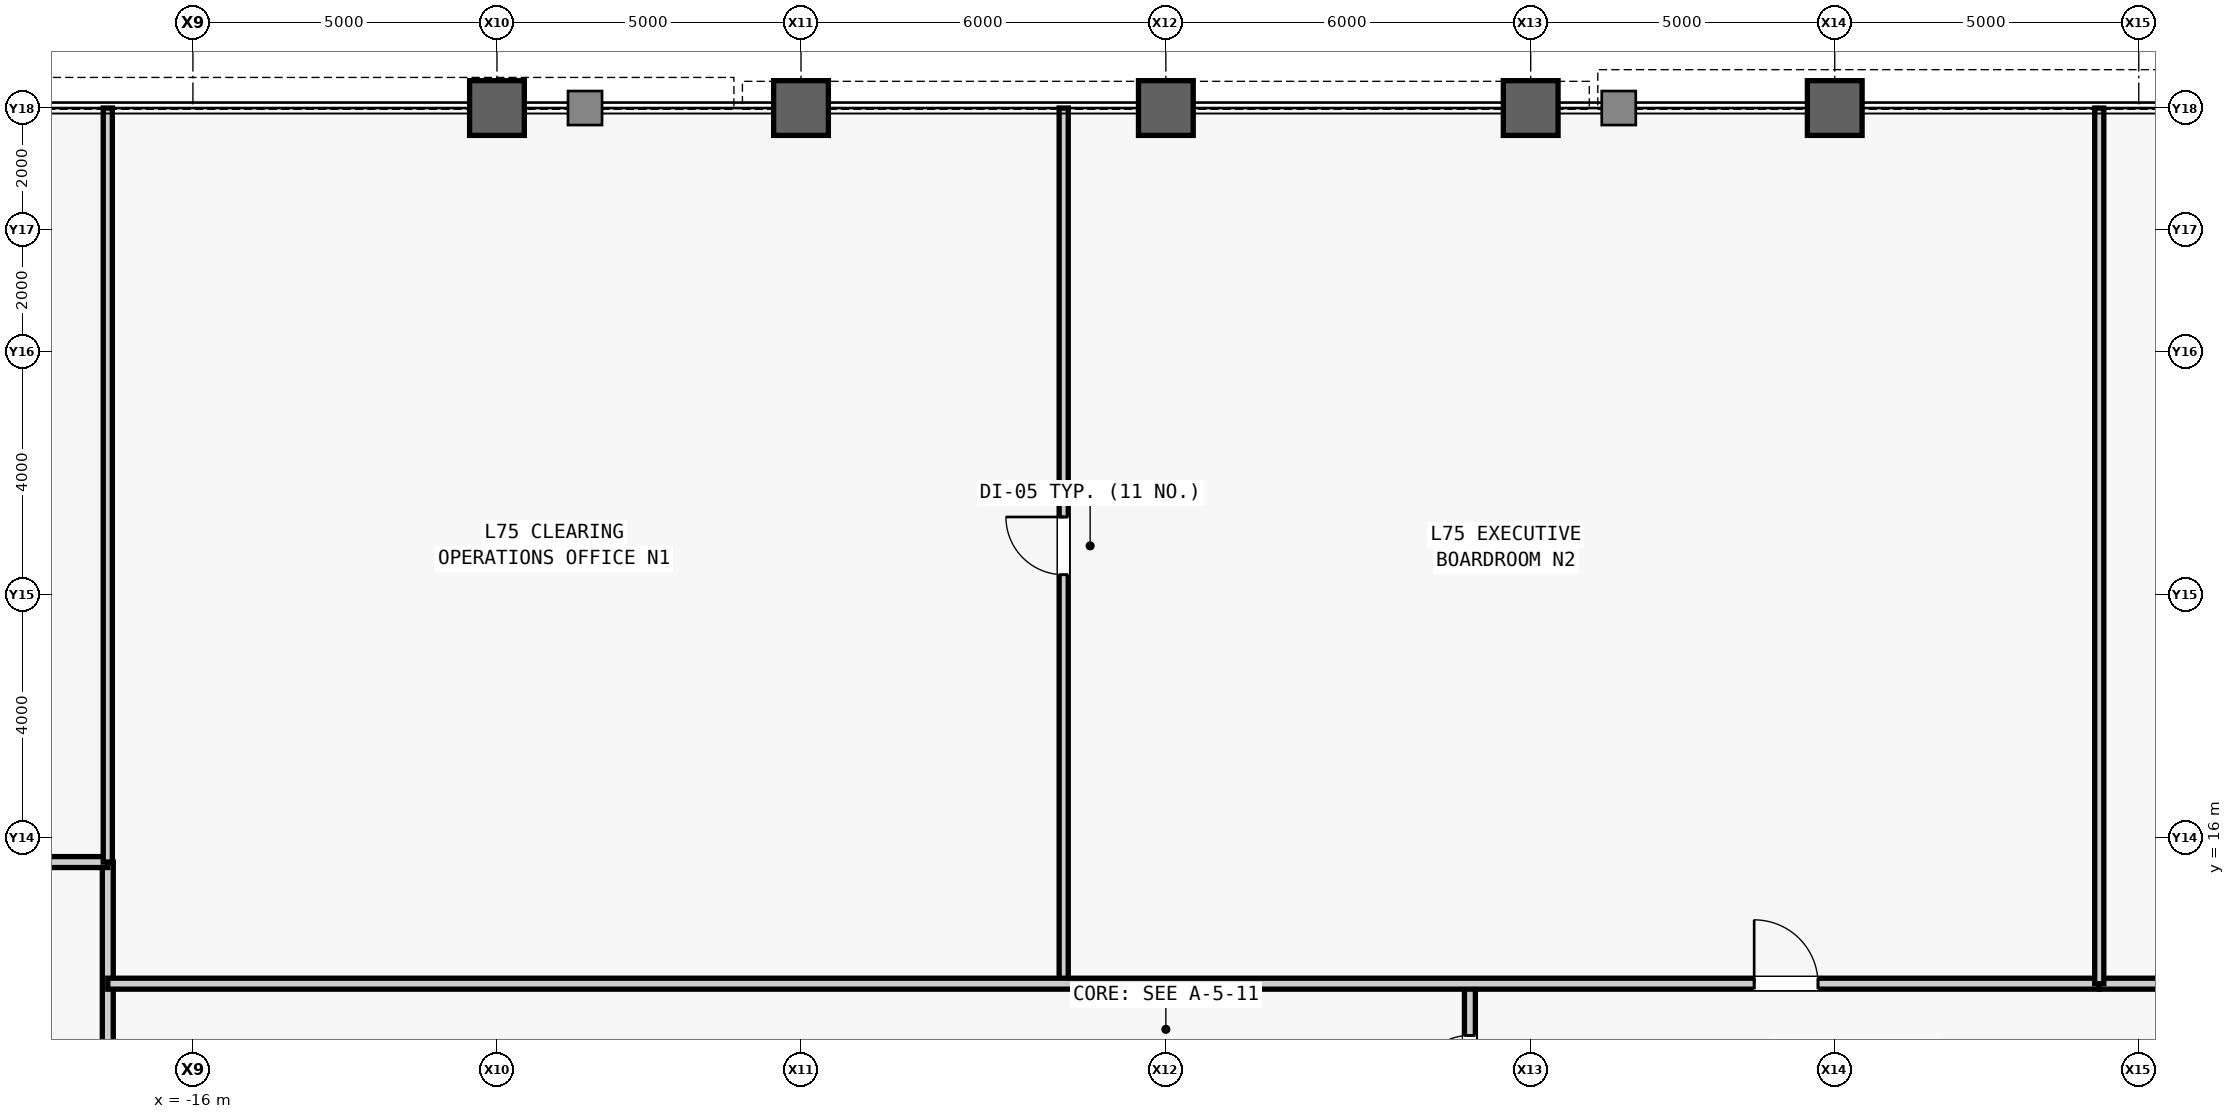
"""IFC4 building model, lengths in metres.
Left out: names, types, materials, properties, quantities, classifications, styles, units other than length and angle.
Written with IfcOpenShell. Run it as: python <this file> out.ifc"""

import sys

from ifc_helpers import new_model, si_unit, direction, frame, frame_2d, origin, origin_2d, place, context, subcontext, project, spatial, rectangle, hollow_rectangle, extrude, source, transform, mapped, element, fill, save


model = new_model("IFC4")
c1 = context("Model", 3, precision=1e-05, world=origin(), true_north=direction((0.0, 1.0)))
c2 = subcontext(c1, "Body", "Model", "MODEL_VIEW")
j1 = project(units=[si_unit("LENGTHUNIT", "METRE"), si_unit("PLANEANGLEUNIT", "RADIAN")], contexts=[c1])
p1 = place(None, origin())
s1 = spatial("IfcSite", under=j1, at=p1, CompositionType="ELEMENT")
p2 = place(p1, origin())
s2 = spatial("IfcBuilding", under=s1, at=p2, CompositionType="ELEMENT")
p3 = place(p2, frame((0.0, 0.0, 317.5)))
s3 = spatial("IfcBuildingStorey", under=s2, at=p3, CompositionType="ELEMENT", Elevation=317.5)
m1 = source(origin(), c2, "Body", "SweptSolid", [
    extrude(hollow_rectangle(XDim=0.9, YDim=0.9, WallThickness=0.05, at=origin_2d()), origin(), (0.0, 0.0, 1.0), 4.0),
])
for number, where, z_axis, x_axis in (
    (1, (-11.0, 28.0, 0.0), (0.0, 0.0, 1.0), (1.0, 0.0, 0.0)),
    (2, (-6.0, 28.0, 0.0), (0.0, 0.0, 1.0), (1.0, 0.0, 0.0)),
    (3, (0.0, 28.0, 0.0), (0.0, 0.0, 1.0), (1.0, 0.0, 0.0)),
    (4, (6.0, 28.0, 0.0), (0.0, 0.0, 1.0), (1.0, 0.0, 0.0)),
    (5, (11.0, 28.0, 0.0), (0.0, 0.0, 1.0), (1.0, 0.0, 0.0)),
):
    element("IfcColumn", number, at=place(p3, frame(where, z_axis=z_axis, x_axis=x_axis)), inside=s3, PredefinedType="COLUMN", context=c2, shape_type="MappedRepresentation", body=[
        mapped(m1, transform((0.0, 0.0, 0.0), scale=1.0)),
    ])
m2 = source(origin(), c2, "Body", "SweptSolid", [
    extrude(rectangle(XDim=8.4, YDim=0.18, at=frame_2d((4.2, 0.0))), origin(), (0.0, 0.0, 1.0), 3.78),
])
p4 = place(p3, frame((-17.4, 7.2, 0.0), z_axis=(0.0, 0.0, 1.0), x_axis=(0.0, 1.0, 0.0)))
e6 = element("IfcWall", 6, at=p4, inside=s3, PredefinedType="PARTITIONING", context=c2, shape_type="MappedRepresentation", body=[
    mapped(m2, transform((0.0, 0.0, 0.0), scale=1.0)),
])
m3 = source(origin(), c2, "Body", "SweptSolid", [
    extrude(rectangle(XDim=2.6, YDim=0.18, at=frame_2d((1.3, 0.0))), origin(), (0.0, 0.0, 1.0), 3.78),
])
p5 = place(p3, frame((5.0, 11.0, 0.0), z_axis=(0.0, 0.0, 1.0), x_axis=(0.0, 1.0, 0.0)))
e7 = element("IfcWall", 7, at=p5, inside=s3, PredefinedType="PARTITIONING", context=c2, shape_type="MappedRepresentation", body=[
    mapped(m3, transform((0.0, 0.0, 0.0), scale=1.0)),
])
m4 = source(origin(), c2, "Body", "SweptSolid", [
    extrude(rectangle(XDim=0.9, YDim=2.15, at=frame_2d((0.45, 1.075))), frame((0.0, 0.1, 0.0), z_axis=(0.0, -1.0, 0.0), x_axis=(1.0, 0.0, 0.0)), (0.0, 0.0, 1.0), 0.2),
])
p6 = place(p5, frame((0.85, 0.0, 0.0)))
e8 = element("IfcOpeningElement", 8, at=p6, cuts=e7, PredefinedType="OPENING", context=c2, shape_type="MappedRepresentation", body=[
    mapped(m4, transform((0.0, 0.0, 0.0), scale=1.0)),
])
m5 = source(origin(), c2, "Body", "SweptSolid", [
    extrude(rectangle(XDim=2.4, YDim=0.18, at=frame_2d((1.2, 0.0))), origin(), (0.0, 0.0, 1.0), 3.78),
])
p7 = place(p3, frame((-19.8, 15.6, 0.0), z_axis=(0.0, 0.0, 1.0), x_axis=(1.0, 0.0, 0.0)))
e9 = element("IfcWall", 9, at=p7, inside=s3, PredefinedType="PARTITIONING", context=c2, shape_type="MappedRepresentation", body=[
    mapped(m5, transform((0.0, 0.0, 0.0), scale=1.0)),
])
m6 = source(origin(), c2, "Body", "SweptSolid", [
    extrude(rectangle(XDim=2.4, YDim=0.18, at=frame_2d((1.2, 0.0))), origin(), (0.0, 0.0, 1.0), 3.78),
])
p8 = place(p3, frame((15.35, 13.6, 0.0), z_axis=(0.0, 0.0, 1.0), x_axis=(1.0, 0.0, 0.0)))
e10 = element("IfcWall", 10, at=p8, inside=s3, PredefinedType="PARTITIONING", context=c2, shape_type="MappedRepresentation", body=[
    mapped(m6, transform((0.0, 0.0, 0.0), scale=1.0)),
])
m7 = source(origin(), c2, "Body", "SweptSolid", [
    extrude(rectangle(XDim=14.4, YDim=0.15, at=frame_2d((7.2, 0.0))), origin(), (0.0, 0.0, 1.0), 3.78),
])
p9 = place(p3, frame((-1.68, 13.6, 0.0), z_axis=(0.0, 0.0, 1.0), x_axis=(0.0, 1.0, 0.0)))
e11 = element("IfcWall", 11, at=p9, inside=s3, PredefinedType="PARTITIONING", context=c2, shape_type="MappedRepresentation", body=[
    mapped(m7, transform((0.0, 0.0, 0.0), scale=1.0)),
])
m8 = source(origin(), c2, "Body", "SweptSolid", [
    extrude(rectangle(XDim=0.95, YDim=2.15, at=frame_2d((0.475, 1.075))), frame((0.0, 0.085, 0.0), z_axis=(0.0, -1.0, 0.0), x_axis=(1.0, 0.0, 0.0)), (0.0, 0.0, 1.0), 0.17),
])
p10 = place(p9, frame((6.725, 0.0, 0.0)))
e12 = element("IfcOpeningElement", 12, at=p10, cuts=e11, PredefinedType="OPENING", context=c2, shape_type="MappedRepresentation", body=[
    mapped(m8, transform((0.0, 0.0, 0.0), scale=1.0)),
])
m9 = source(origin(), c2, "Body", "SweptSolid", [
    extrude(rectangle(XDim=32.75, YDim=0.18, at=frame_2d((16.375, 0.0))), origin(), (0.0, 0.0, 1.0), 3.78),
])
p11 = place(p3, frame((-17.4, 13.6, 0.0), z_axis=(0.0, 0.0, 1.0), x_axis=(1.0, 0.0, 0.0)))
e13 = element("IfcWall", 13, at=p11, inside=s3, PredefinedType="PARTITIONING", context=c2, shape_type="MappedRepresentation", body=[
    mapped(m9, transform((0.0, 0.0, 0.0), scale=1.0)),
])
m10 = source(origin(), c2, "Body", "SweptSolid", [
    extrude(rectangle(XDim=1.05, YDim=2.2, at=frame_2d((0.525, 1.1))), frame((0.0, 0.1, 0.0), z_axis=(0.0, -1.0, 0.0), x_axis=(1.0, 0.0, 0.0)), (0.0, 0.0, 1.0), 0.2),
])
p12 = place(p11, frame((27.075, 0.0, 0.0)))
e14 = element("IfcOpeningElement", 14, at=p12, cuts=e13, PredefinedType="OPENING", context=c2, shape_type="MappedRepresentation", body=[
    mapped(m10, transform((0.0, 0.0, 0.0), scale=1.0)),
])
m11 = source(origin(), c2, "Body", "SweptSolid", [
    extrude(rectangle(XDim=12.4, YDim=0.15, at=frame_2d((6.2, 0.0))), origin(), (0.0, 0.0, 1.0), 3.78),
])
p13 = place(p3, frame((-17.4, 15.6, 0.0), z_axis=(0.0, 0.0, 1.0), x_axis=(0.0, 1.0, 0.0)))
e15 = element("IfcWall", 15, at=p13, inside=s3, PredefinedType="PARTITIONING", context=c2, shape_type="MappedRepresentation", body=[
    mapped(m11, transform((0.0, 0.0, 0.0), scale=1.0)),
])
p14 = place(p3, frame((15.35, 13.6, 0.0), z_axis=(0.0, 0.0, 1.0), x_axis=(0.0, 1.0, 0.0)))
e16 = element("IfcWall", 16, at=p14, inside=s3, PredefinedType="PARTITIONING", context=c2, shape_type="MappedRepresentation", body=[
    mapped(m7, transform((0.0, 0.0, 0.0), scale=1.0)),
])
m12 = source(origin(), c2, "Body", "SweptSolid", [
    extrude(rectangle(XDim=0.9, YDim=2.15, at=frame_2d((0.45, 1.075))), frame((0.0, 0.025, 0.0), z_axis=(0.0, -1.0, 0.0), x_axis=(1.0, 0.0, 0.0)), (0.0, 0.0, 1.0), 0.05),
])
p15 = place(p6, origin())
e17 = element("IfcDoor", 17, at=p15, inside=s3, OperationType="SINGLE_SWING_LEFT", PredefinedType="DOOR", context=c2, shape_type="MappedRepresentation", body=[
    mapped(m12, transform((0.0, 0.0, 0.0), scale=1.0)),
])
fill(e8, e17)
m13 = source(origin(), c2, "Body", "SweptSolid", [
    extrude(rectangle(XDim=0.95, YDim=2.15, at=frame_2d((0.475, 1.075))), frame((0.0, 0.025, 0.0), z_axis=(0.0, -1.0, 0.0), x_axis=(1.0, 0.0, 0.0)), (0.0, 0.0, 1.0), 0.05),
])
p16 = place(p10, origin())
e18 = element("IfcDoor", 18, at=p16, inside=s3, OperationType="SINGLE_SWING_RIGHT", PredefinedType="DOOR", context=c2, shape_type="MappedRepresentation", body=[
    mapped(m13, transform((0.0, 0.0, 0.0), scale=1.0)),
])
fill(e12, e18)
m14 = source(origin(), c2, "Body", "SweptSolid", [
    extrude(rectangle(XDim=1.05, YDim=2.2, at=frame_2d((0.525, 1.1))), frame((0.0, 0.025, 0.0), z_axis=(0.0, -1.0, 0.0), x_axis=(1.0, 0.0, 0.0)), (0.0, 0.0, 1.0), 0.05),
])
p17 = place(p12, origin())
e19 = element("IfcDoor", 19, at=p17, inside=s3, OperationType="SINGLE_SWING_LEFT", PredefinedType="DOOR", context=c2, shape_type="MappedRepresentation", body=[
    mapped(m14, transform((0.0, 0.0, 0.0), scale=1.0)),
])
fill(e14, e19)
save(model, sys.argv[1])
